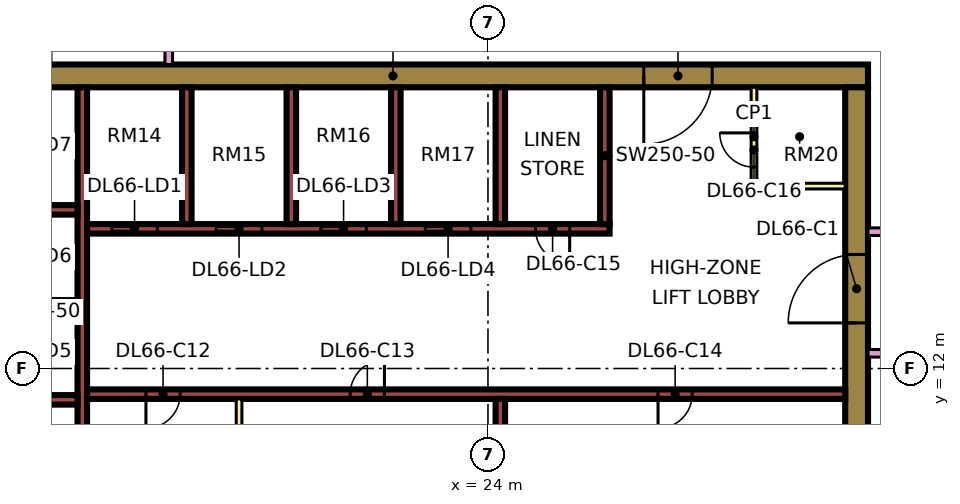
"""IFC4 building model, lengths in metres.
Left out: names, types, materials, properties, quantities, classifications, styles, units other than length and angle.
Written with IfcOpenShell. Run it as: python <this file> out.ifc"""

import sys

from ifc_helpers import new_model, si_unit, direction, frame, frame_2d, origin, place, context, subcontext, project, spatial, rectangle, extrude, element, fill, save


model = new_model("IFC4")
c1 = context("Model", 3, precision=1e-05, world=origin(), true_north=direction((0.0, 1.0)))
c2 = subcontext(c1, "Body", "Model", "MODEL_VIEW")
j1 = project(units=[si_unit("LENGTHUNIT", "METRE"), si_unit("PLANEANGLEUNIT", "RADIAN")], contexts=[c1])
p1 = place(None, origin())
s1 = spatial("IfcSite", under=j1, at=p1, CompositionType="ELEMENT")
p2 = place(p1, origin())
s2 = spatial("IfcBuilding", under=s1, at=p2, CompositionType="ELEMENT")
p3 = place(p2, frame((0.0, 0.0, 284.65)))
s3 = spatial("IfcBuildingStorey", under=s2, at=p3, CompositionType="ELEMENT", Elevation=284.65)
p4 = place(p3, frame((9.0, 19.7, 0.0), z_axis=(0.0, 0.0, 1.0), x_axis=(1.0, 0.0, 0.0)))
e1 = element("IfcWall", 1, at=p4, inside=s3, PredefinedType="SHEAR", context=c2, shape_type="SweptSolid", body=[
    extrude(rectangle(XDim=25.0, YDim=0.6, at=frame_2d((12.5, 0.0))), origin(), (0.0, 0.0, 1.0), 3.75),
])
p5 = place(p4, frame((19.1, 0.0, 0.0)))
e2 = element("IfcOpeningElement", 2, at=p5, cuts=e1, PredefinedType="OPENING", context=c2, shape_type="SweptSolid", body=[
    extrude(rectangle(XDim=1.8, YDim=2.4, at=frame_2d((0.9, 1.2))), frame((0.0, 0.31, 0.0), z_axis=(0.0, -1.0, 0.0), x_axis=(1.0, 0.0, 0.0)), (0.0, 0.0, 1.0), 0.62),
])
p6 = place(p3, frame((33.7, 7.6, 0.0), z_axis=(0.0, 0.0, 1.0), x_axis=(0.0, 1.0, 0.0)))
e3 = element("IfcWall", 3, at=p6, inside=s3, PredefinedType="SHEAR", context=c2, shape_type="SweptSolid", body=[
    extrude(rectangle(XDim=11.8, YDim=0.6, at=frame_2d((5.9, 0.0))), origin(), (0.0, 0.0, 1.0), 3.75),
])
p7 = place(p6, frame((5.6, 0.0, 0.0)))
e4 = element("IfcOpeningElement", 4, at=p7, cuts=e3, PredefinedType="OPENING", context=c2, shape_type="SweptSolid", body=[
    extrude(rectangle(XDim=1.8, YDim=2.4, at=frame_2d((0.9, 1.2))), frame((0.0, 0.31, 0.0), z_axis=(0.0, -1.0, 0.0), x_axis=(1.0, 0.0, 0.0)), (0.0, 0.0, 1.0), 0.62),
])
p8 = place(p3, frame((13.325, 7.6, 0.0), z_axis=(0.0, 0.0, 1.0), x_axis=(0.0, 1.0, 0.0)))
e5 = element("IfcWall", 5, at=p8, inside=s3, PredefinedType="SHEAR", context=c2, shape_type="SweptSolid", body=[
    extrude(rectangle(XDim=11.8, YDim=0.25, at=frame_2d((5.9, 0.0))), origin(), (0.0, 0.0, 1.0), 3.75),
])
p9 = place(p3, frame((13.45, 11.325, 0.0), z_axis=(0.0, 0.0, 1.0), x_axis=(1.0, 0.0, 0.0)))
e6 = element("IfcWall", 6, at=p9, inside=s3, PredefinedType="SHEAR", context=c2, shape_type="SweptSolid", body=[
    extrude(rectangle(XDim=19.95, YDim=0.25, at=frame_2d((9.975, 0.0))), origin(), (0.0, 0.0, 1.0), 3.75),
])
p10 = place(p9, frame((1.55, 0.0, 0.0)))
e7 = element("IfcOpeningElement", 7, at=p10, cuts=e6, PredefinedType="OPENING", context=c2, shape_type="SweptSolid", body=[
    extrude(rectangle(XDim=0.9, YDim=2.1, at=frame_2d((0.45, 1.05))), frame((0.0, 0.135, 0.0), z_axis=(0.0, -1.0, 0.0), x_axis=(1.0, 0.0, 0.0)), (0.0, 0.0, 1.0), 0.27),
])
p11 = place(p9, frame((6.925, 0.0, 0.0)))
e8 = element("IfcOpeningElement", 8, at=p11, cuts=e6, PredefinedType="OPENING", context=c2, shape_type="SweptSolid", body=[
    extrude(rectangle(XDim=0.9, YDim=2.1, at=frame_2d((0.45, 1.05))), frame((0.0, 0.135, 0.0), z_axis=(0.0, -1.0, 0.0), x_axis=(1.0, 0.0, 0.0)), (0.0, 0.0, 1.0), 0.27),
])
p12 = place(p9, frame((15.025, 0.0, 0.0)))
e9 = element("IfcOpeningElement", 9, at=p12, cuts=e6, PredefinedType="OPENING", context=c2, shape_type="SweptSolid", body=[
    extrude(rectangle(XDim=0.9, YDim=2.1, at=frame_2d((0.45, 1.05))), frame((0.0, 0.135, 0.0), z_axis=(0.0, -1.0, 0.0), x_axis=(1.0, 0.0, 0.0)), (0.0, 0.0, 1.0), 0.27),
])
p13 = place(p3, frame((13.45, 15.675, 0.0), z_axis=(0.0, 0.0, 1.0), x_axis=(1.0, 0.0, 0.0)))
e10 = element("IfcWall", 10, at=p13, inside=s3, PredefinedType="SHEAR", context=c2, shape_type="SweptSolid", body=[
    extrude(rectangle(XDim=13.75, YDim=0.25, at=frame_2d((6.875, 0.0))), origin(), (0.0, 0.0, 1.0), 3.75),
])
p14 = place(p13, frame((0.65, 0.0, 0.0)))
e11 = element("IfcOpeningElement", 11, at=p14, cuts=e10, PredefinedType="OPENING", context=c2, shape_type="SweptSolid", body=[
    extrude(rectangle(XDim=1.2, YDim=2.2, at=frame_2d((0.6, 1.1))), frame((0.0, 0.135, 0.0), z_axis=(0.0, -1.0, 0.0), x_axis=(1.0, 0.0, 0.0)), (0.0, 0.0, 1.0), 0.27),
])
p15 = place(p13, frame((3.4, 0.0, 0.0)))
e12 = element("IfcOpeningElement", 12, at=p15, cuts=e10, PredefinedType="OPENING", context=c2, shape_type="SweptSolid", body=[
    extrude(rectangle(XDim=1.2, YDim=2.2, at=frame_2d((0.6, 1.1))), frame((0.0, 0.135, 0.0), z_axis=(0.0, -1.0, 0.0), x_axis=(1.0, 0.0, 0.0)), (0.0, 0.0, 1.0), 0.27),
])
p16 = place(p13, frame((6.15, 0.0, 0.0)))
e13 = element("IfcOpeningElement", 13, at=p16, cuts=e10, PredefinedType="OPENING", context=c2, shape_type="SweptSolid", body=[
    extrude(rectangle(XDim=1.2, YDim=2.2, at=frame_2d((0.6, 1.1))), frame((0.0, 0.135, 0.0), z_axis=(0.0, -1.0, 0.0), x_axis=(1.0, 0.0, 0.0)), (0.0, 0.0, 1.0), 0.27),
])
p17 = place(p13, frame((8.9, 0.0, 0.0)))
e14 = element("IfcOpeningElement", 14, at=p17, cuts=e10, PredefinedType="OPENING", context=c2, shape_type="SweptSolid", body=[
    extrude(rectangle(XDim=1.2, YDim=2.2, at=frame_2d((0.6, 1.1))), frame((0.0, 0.135, 0.0), z_axis=(0.0, -1.0, 0.0), x_axis=(1.0, 0.0, 0.0)), (0.0, 0.0, 1.0), 0.27),
])
p18 = place(p13, frame((11.8, 0.0, 0.0)))
e15 = element("IfcOpeningElement", 15, at=p18, cuts=e10, PredefinedType="OPENING", context=c2, shape_type="SweptSolid", body=[
    extrude(rectangle(XDim=0.9, YDim=2.1, at=frame_2d((0.45, 1.05))), frame((0.0, 0.135, 0.0), z_axis=(0.0, -1.0, 0.0), x_axis=(1.0, 0.0, 0.0)), (0.0, 0.0, 1.0), 0.27),
])
for number, where, z_axis, x_axis in (
    (16, (10.2, 11.175, 0.0), (0.0, 0.0, 1.0), (1.0, 0.0, 0.0)),
    (17, (10.2, 13.675, 0.0), (0.0, 0.0, 1.0), (1.0, 0.0, 0.0)),
    (18, (10.2, 16.175, 0.0), (0.0, 0.0, 1.0), (1.0, 0.0, 0.0)),
):
    element("IfcWall", number, at=place(p3, frame(where, z_axis=z_axis, x_axis=x_axis)), inside=s3, PredefinedType="SHEAR", context=c2, shape_type="SweptSolid", body=[
        extrude(rectangle(XDim=3.0, YDim=0.25, at=frame_2d((1.5, 0.0))), origin(), (0.0, 0.0, 1.0), 3.75),
    ])
for number, where, z_axis, x_axis in (
    (19, (24.325, 7.6, 0.0), (0.0, 0.0, 1.0), (0.0, 1.0, 0.0)),
    (20, (16.075, 15.8, 0.0), (0.0, 0.0, 1.0), (0.0, 1.0, 0.0)),
    (21, (18.825, 15.8, 0.0), (0.0, 0.0, 1.0), (0.0, 1.0, 0.0)),
    (22, (21.575, 15.8, 0.0), (0.0, 0.0, 1.0), (0.0, 1.0, 0.0)),
    (23, (24.325, 15.8, 0.0), (0.0, 0.0, 1.0), (0.0, 1.0, 0.0)),
    (24, (27.075, 15.8, 0.0), (0.0, 0.0, 1.0), (0.0, 1.0, 0.0)),
):
    element("IfcWall", number, at=place(p3, frame(where, z_axis=z_axis, x_axis=x_axis)), inside=s3, PredefinedType="SHEAR", context=c2, shape_type="SweptSolid", body=[
        extrude(rectangle(XDim=3.6, YDim=0.25, at=frame_2d((1.8, 0.0))), origin(), (0.0, 0.0, 1.0), 3.75),
    ])
p19 = place(p3, frame((-1.447, 12.553, 0.0), z_axis=(0.0, 0.0, 1.0), x_axis=(0.707106781187, -0.707106781187, 0.0)))
e25 = element("IfcWall", 25, at=p19, inside=s3, PredefinedType="SOLIDWALL", context=c2, shape_type="SweptSolid", body=[
    extrude(rectangle(XDim=19.799, YDim=0.15, at=frame_2d((9.899, 0.0))), origin(), (0.0, 0.0, 1.0), 3.35),
])
p20 = place(p19, frame((2.212, 0.0, 0.45)))
e26 = element("IfcOpeningElement", 26, at=p20, cuts=e25, PredefinedType="OPENING", context=c2, shape_type="SweptSolid", body=[
    extrude(rectangle(XDim=3.0, YDim=2.4, at=frame_2d((1.5, 1.2))), frame((0.0, 0.085, 0.0), z_axis=(0.0, -1.0, 0.0), x_axis=(1.0, 0.0, 0.0)), (0.0, 0.0, 1.0), 0.17),
])
p21 = place(p19, frame((10.216, 0.0, 0.45)))
e27 = element("IfcOpeningElement", 27, at=p21, cuts=e25, PredefinedType="OPENING", context=c2, shape_type="SweptSolid", body=[
    extrude(rectangle(XDim=3.0, YDim=2.4, at=frame_2d((1.5, 1.2))), frame((0.0, 0.085, 0.0), z_axis=(0.0, -1.0, 0.0), x_axis=(1.0, 0.0, 0.0)), (0.0, 0.0, 1.0), 0.17),
])
p22 = place(p3, frame((17.45, 7.6, 0.0), z_axis=(0.0, 0.0, 1.0), x_axis=(0.0, 1.0, 0.0)))
e28 = element("IfcWall", 28, at=p22, inside=s3, PredefinedType="PARTITIONING", context=c2, shape_type="SweptSolid", body=[
    extrude(rectangle(XDim=3.6, YDim=0.15, at=frame_2d((1.8, 0.0))), origin(), (0.0, 0.0, 1.0), 3.35),
])
p23 = place(p3, frame((31.0, 16.8, 0.0), z_axis=(0.0, 0.0, 1.0), x_axis=(0.0, 1.0, 0.0)))
e29 = element("IfcWall", 29, at=p23, inside=s3, PredefinedType="PARTITIONING", context=c2, shape_type="SweptSolid", body=[
    extrude(rectangle(XDim=2.6, YDim=0.15, at=frame_2d((1.3, 0.0))), origin(), (0.0, 0.0, 1.0), 3.35),
])
p24 = place(p23, frame((0.5, 0.0, 0.0)))
e30 = element("IfcOpeningElement", 30, at=p24, cuts=e29, PredefinedType="OPENING", context=c2, shape_type="SweptSolid", body=[
    extrude(rectangle(XDim=0.9, YDim=2.1, at=frame_2d((0.45, 1.05))), frame((0.0, 0.085, 0.0), z_axis=(0.0, -1.0, 0.0), x_axis=(1.0, 0.0, 0.0)), (0.0, 0.0, 1.0), 0.17),
])
p25 = place(p3, frame((31.0, 16.8, 0.0), z_axis=(0.0, 0.0, 1.0), x_axis=(1.0, 0.0, 0.0)))
e31 = element("IfcWall", 31, at=p25, inside=s3, PredefinedType="PARTITIONING", context=c2, shape_type="SweptSolid", body=[
    extrude(rectangle(XDim=2.4, YDim=0.15, at=frame_2d((1.2, 0.0))), origin(), (0.0, 0.0, 1.0), 3.35),
])
p26 = place(p3, frame((15.6, 20.0, 0.0), z_axis=(0.0, 0.0, 1.0), x_axis=(0.0, 1.0, 0.0)))
e32 = element("IfcWall", 32, at=p26, inside=s3, PredefinedType="PARTITIONING", context=c2, shape_type="SweptSolid", body=[
    extrude(rectangle(XDim=27.775, YDim=0.2, at=frame_2d((13.887, 0.0))), origin(), (0.0, 0.0, 1.0), 3.35),
])
p27 = place(p26, frame((5.95, 0.0, 0.0)))
e33 = element("IfcOpeningElement", 33, at=p27, cuts=e32, PredefinedType="OPENING", context=c2, shape_type="SweptSolid", body=[
    extrude(rectangle(XDim=1.0, YDim=2.1, at=frame_2d((0.5, 1.05))), frame((0.0, 0.11, 0.0), z_axis=(0.0, -1.0, 0.0), x_axis=(1.0, 0.0, 0.0)), (0.0, 0.0, 1.0), 0.22),
])
p28 = place(p26, frame((12.0, 0.0, 0.0)))
e34 = element("IfcOpeningElement", 34, at=p28, cuts=e32, PredefinedType="OPENING", context=c2, shape_type="SweptSolid", body=[
    extrude(rectangle(XDim=1.0, YDim=2.1, at=frame_2d((0.5, 1.05))), frame((0.0, 0.11, 0.0), z_axis=(0.0, -1.0, 0.0), x_axis=(1.0, 0.0, 0.0)), (0.0, 0.0, 1.0), 0.22),
])
p29 = place(p26, frame((22.9, 0.0, 0.0)))
e35 = element("IfcOpeningElement", 35, at=p29, cuts=e32, PredefinedType="OPENING", context=c2, shape_type="SweptSolid", body=[
    extrude(rectangle(XDim=1.0, YDim=2.1, at=frame_2d((0.5, 1.05))), frame((0.0, 0.11, 0.0), z_axis=(0.0, -1.0, 0.0), x_axis=(1.0, 0.0, 0.0)), (0.0, 0.0, 1.0), 0.22),
])
p30 = place(p26, frame((1.15, 0.0, 0.0)))
e36 = element("IfcOpeningElement", 36, at=p30, cuts=e32, PredefinedType="OPENING", context=c2, shape_type="SweptSolid", body=[
    extrude(rectangle(XDim=1.8, YDim=2.1, at=frame_2d((0.9, 1.05))), frame((0.0, 0.11, 0.0), z_axis=(0.0, -1.0, 0.0), x_axis=(1.0, 0.0, 0.0)), (0.0, 0.0, 1.0), 0.22),
])
p31 = place(p26, frame((25.9, 0.0, 0.0)))
e37 = element("IfcOpeningElement", 37, at=p31, cuts=e32, PredefinedType="OPENING", context=c2, shape_type="SweptSolid", body=[
    extrude(rectangle(XDim=1.0, YDim=2.1, at=frame_2d((0.5, 1.05))), frame((0.0, 0.11, 0.0), z_axis=(0.0, -1.0, 0.0), x_axis=(1.0, 0.0, 0.0)), (0.0, 0.0, 1.0), 0.22),
])
p32 = place(p3, frame((34.0, 12.4, 0.0), z_axis=(0.0, 0.0, 1.0), x_axis=(1.0, 0.0, 0.0)))
e38 = element("IfcWall", 38, at=p32, inside=s3, PredefinedType="PARTITIONING", context=c2, shape_type="SweptSolid", body=[
    extrude(rectangle(XDim=2.401, YDim=0.2, at=frame_2d((1.2, 0.0))), origin(), (0.0, 0.0, 1.0), 3.35),
])
p33 = place(p3, frame((34.0, 15.6, 0.0), z_axis=(0.0, 0.0, 1.0), x_axis=(1.0, 0.0, 0.0)))
e39 = element("IfcWall", 39, at=p33, inside=s3, PredefinedType="PARTITIONING", context=c2, shape_type="SweptSolid", body=[
    extrude(rectangle(XDim=10.35, YDim=0.2, at=frame_2d((5.175, 0.0))), origin(), (0.0, 0.0, 1.0), 3.35),
])
p34 = place(p33, frame((5.6, 0.0, 0.0)))
e40 = element("IfcOpeningElement", 40, at=p34, cuts=e39, PredefinedType="OPENING", context=c2, shape_type="SweptSolid", body=[
    extrude(rectangle(XDim=1.0, YDim=2.1, at=frame_2d((0.5, 1.05))), frame((0.0, 0.11, 0.0), z_axis=(0.0, -1.0, 0.0), x_axis=(1.0, 0.0, 0.0)), (0.0, 0.0, 1.0), 0.22),
])
p35 = place(p33, frame((0.45, 0.0, 0.0)))
e41 = element("IfcOpeningElement", 41, at=p35, cuts=e39, PredefinedType="OPENING", context=c2, shape_type="SweptSolid", body=[
    extrude(rectangle(XDim=1.2, YDim=2.1, at=frame_2d((0.6, 1.05))), frame((0.0, 0.11, 0.0), z_axis=(0.0, -1.0, 0.0), x_axis=(1.0, 0.0, 0.0)), (0.0, 0.0, 1.0), 0.22),
])
p36 = place(p14, origin())
e42 = element("IfcDoor", 42, at=p36, inside=s3, OperationType="DOUBLE_DOOR_SLIDING", PredefinedType="DOOR", context=c2, shape_type="SweptSolid", body=[
    extrude(rectangle(XDim=1.2, YDim=2.2, at=frame_2d((0.6, 1.1))), frame((0.0, 0.025, 0.0), z_axis=(0.0, -1.0, 0.0), x_axis=(1.0, 0.0, 0.0)), (0.0, 0.0, 1.0), 0.05),
])
fill(e11, e42)
p37 = place(p15, origin())
e43 = element("IfcDoor", 43, at=p37, inside=s3, OperationType="DOUBLE_DOOR_SLIDING", PredefinedType="DOOR", context=c2, shape_type="SweptSolid", body=[
    extrude(rectangle(XDim=1.2, YDim=2.2, at=frame_2d((0.6, 1.1))), frame((0.0, 0.025, 0.0), z_axis=(0.0, -1.0, 0.0), x_axis=(1.0, 0.0, 0.0)), (0.0, 0.0, 1.0), 0.05),
])
fill(e12, e43)
p38 = place(p16, origin())
e44 = element("IfcDoor", 44, at=p38, inside=s3, OperationType="DOUBLE_DOOR_SLIDING", PredefinedType="DOOR", context=c2, shape_type="SweptSolid", body=[
    extrude(rectangle(XDim=1.2, YDim=2.2, at=frame_2d((0.6, 1.1))), frame((0.0, 0.025, 0.0), z_axis=(0.0, -1.0, 0.0), x_axis=(1.0, 0.0, 0.0)), (0.0, 0.0, 1.0), 0.05),
])
fill(e13, e44)
p39 = place(p17, origin())
e45 = element("IfcDoor", 45, at=p39, inside=s3, OperationType="DOUBLE_DOOR_SLIDING", PredefinedType="DOOR", context=c2, shape_type="SweptSolid", body=[
    extrude(rectangle(XDim=1.2, YDim=2.2, at=frame_2d((0.6, 1.1))), frame((0.0, 0.025, 0.0), z_axis=(0.0, -1.0, 0.0), x_axis=(1.0, 0.0, 0.0)), (0.0, 0.0, 1.0), 0.05),
])
fill(e14, e45)
p40 = place(p7, origin())
e46 = element("IfcDoor", 46, at=p40, inside=s3, OperationType="DOUBLE_DOOR_SINGLE_SWING", PredefinedType="DOOR", context=c2, shape_type="SweptSolid", body=[
    extrude(rectangle(XDim=1.8, YDim=2.4, at=frame_2d((0.9, 1.2))), frame((0.0, 0.025, 0.0), z_axis=(0.0, -1.0, 0.0), x_axis=(1.0, 0.0, 0.0)), (0.0, 0.0, 1.0), 0.05),
])
fill(e4, e46)
p41 = place(p5, frame((1.8, 0.0, 0.0), z_axis=(0.0, 0.0, 1.0), x_axis=(-1.0, 0.0, 0.0)))
e47 = element("IfcDoor", 47, at=p41, inside=s3, OperationType="DOUBLE_DOOR_SINGLE_SWING", PredefinedType="DOOR", context=c2, shape_type="SweptSolid", body=[
    extrude(rectangle(XDim=1.8, YDim=2.4, at=frame_2d((0.9, 1.2))), frame((0.0, 0.025, 0.0), z_axis=(0.0, -1.0, 0.0), x_axis=(1.0, 0.0, 0.0)), (0.0, 0.0, 1.0), 0.05),
])
fill(e2, e47)
p42 = place(p10, frame((0.9, 0.0, 0.0), z_axis=(0.0, 0.0, 1.0), x_axis=(-1.0, 0.0, 0.0)))
e48 = element("IfcDoor", 48, at=p42, inside=s3, OperationType="SINGLE_SWING_LEFT", PredefinedType="DOOR", context=c2, shape_type="SweptSolid", body=[
    extrude(rectangle(XDim=0.9, YDim=2.1, at=frame_2d((0.45, 1.05))), frame((0.0, 0.025, 0.0), z_axis=(0.0, -1.0, 0.0), x_axis=(1.0, 0.0, 0.0)), (0.0, 0.0, 1.0), 0.05),
])
fill(e7, e48)
p43 = place(p11, frame((0.9, 0.0, 0.0), z_axis=(0.0, 0.0, 1.0), x_axis=(-1.0, 0.0, 0.0)))
e49 = element("IfcDoor", 49, at=p43, inside=s3, OperationType="SINGLE_SWING_RIGHT", PredefinedType="DOOR", context=c2, shape_type="SweptSolid", body=[
    extrude(rectangle(XDim=0.9, YDim=2.1, at=frame_2d((0.45, 1.05))), frame((0.0, 0.025, 0.0), z_axis=(0.0, -1.0, 0.0), x_axis=(1.0, 0.0, 0.0)), (0.0, 0.0, 1.0), 0.05),
])
fill(e8, e49)
p44 = place(p12, frame((0.9, 0.0, 0.0), z_axis=(0.0, 0.0, 1.0), x_axis=(-1.0, 0.0, 0.0)))
e50 = element("IfcDoor", 50, at=p44, inside=s3, OperationType="SINGLE_SWING_LEFT", PredefinedType="DOOR", context=c2, shape_type="SweptSolid", body=[
    extrude(rectangle(XDim=0.9, YDim=2.1, at=frame_2d((0.45, 1.05))), frame((0.0, 0.025, 0.0), z_axis=(0.0, -1.0, 0.0), x_axis=(1.0, 0.0, 0.0)), (0.0, 0.0, 1.0), 0.05),
])
fill(e9, e50)
p45 = place(p18, origin())
e51 = element("IfcDoor", 51, at=p45, inside=s3, OperationType="SINGLE_SWING_RIGHT", PredefinedType="DOOR", context=c2, shape_type="SweptSolid", body=[
    extrude(rectangle(XDim=0.9, YDim=2.1, at=frame_2d((0.45, 1.05))), frame((0.0, 0.025, 0.0), z_axis=(0.0, -1.0, 0.0), x_axis=(1.0, 0.0, 0.0)), (0.0, 0.0, 1.0), 0.05),
])
fill(e15, e51)
p46 = place(p24, frame((0.9, 0.0, 0.0), z_axis=(0.0, 0.0, 1.0), x_axis=(-1.0, 0.0, 0.0)))
e52 = element("IfcDoor", 52, at=p46, inside=s3, OperationType="SINGLE_SWING_RIGHT", PredefinedType="DOOR", context=c2, shape_type="SweptSolid", body=[
    extrude(rectangle(XDim=0.9, YDim=2.1, at=frame_2d((0.45, 1.05))), frame((0.0, 0.025, 0.0), z_axis=(0.0, -1.0, 0.0), x_axis=(1.0, 0.0, 0.0)), (0.0, 0.0, 1.0), 0.05),
])
fill(e30, e52)
save(model, sys.argv[1])
